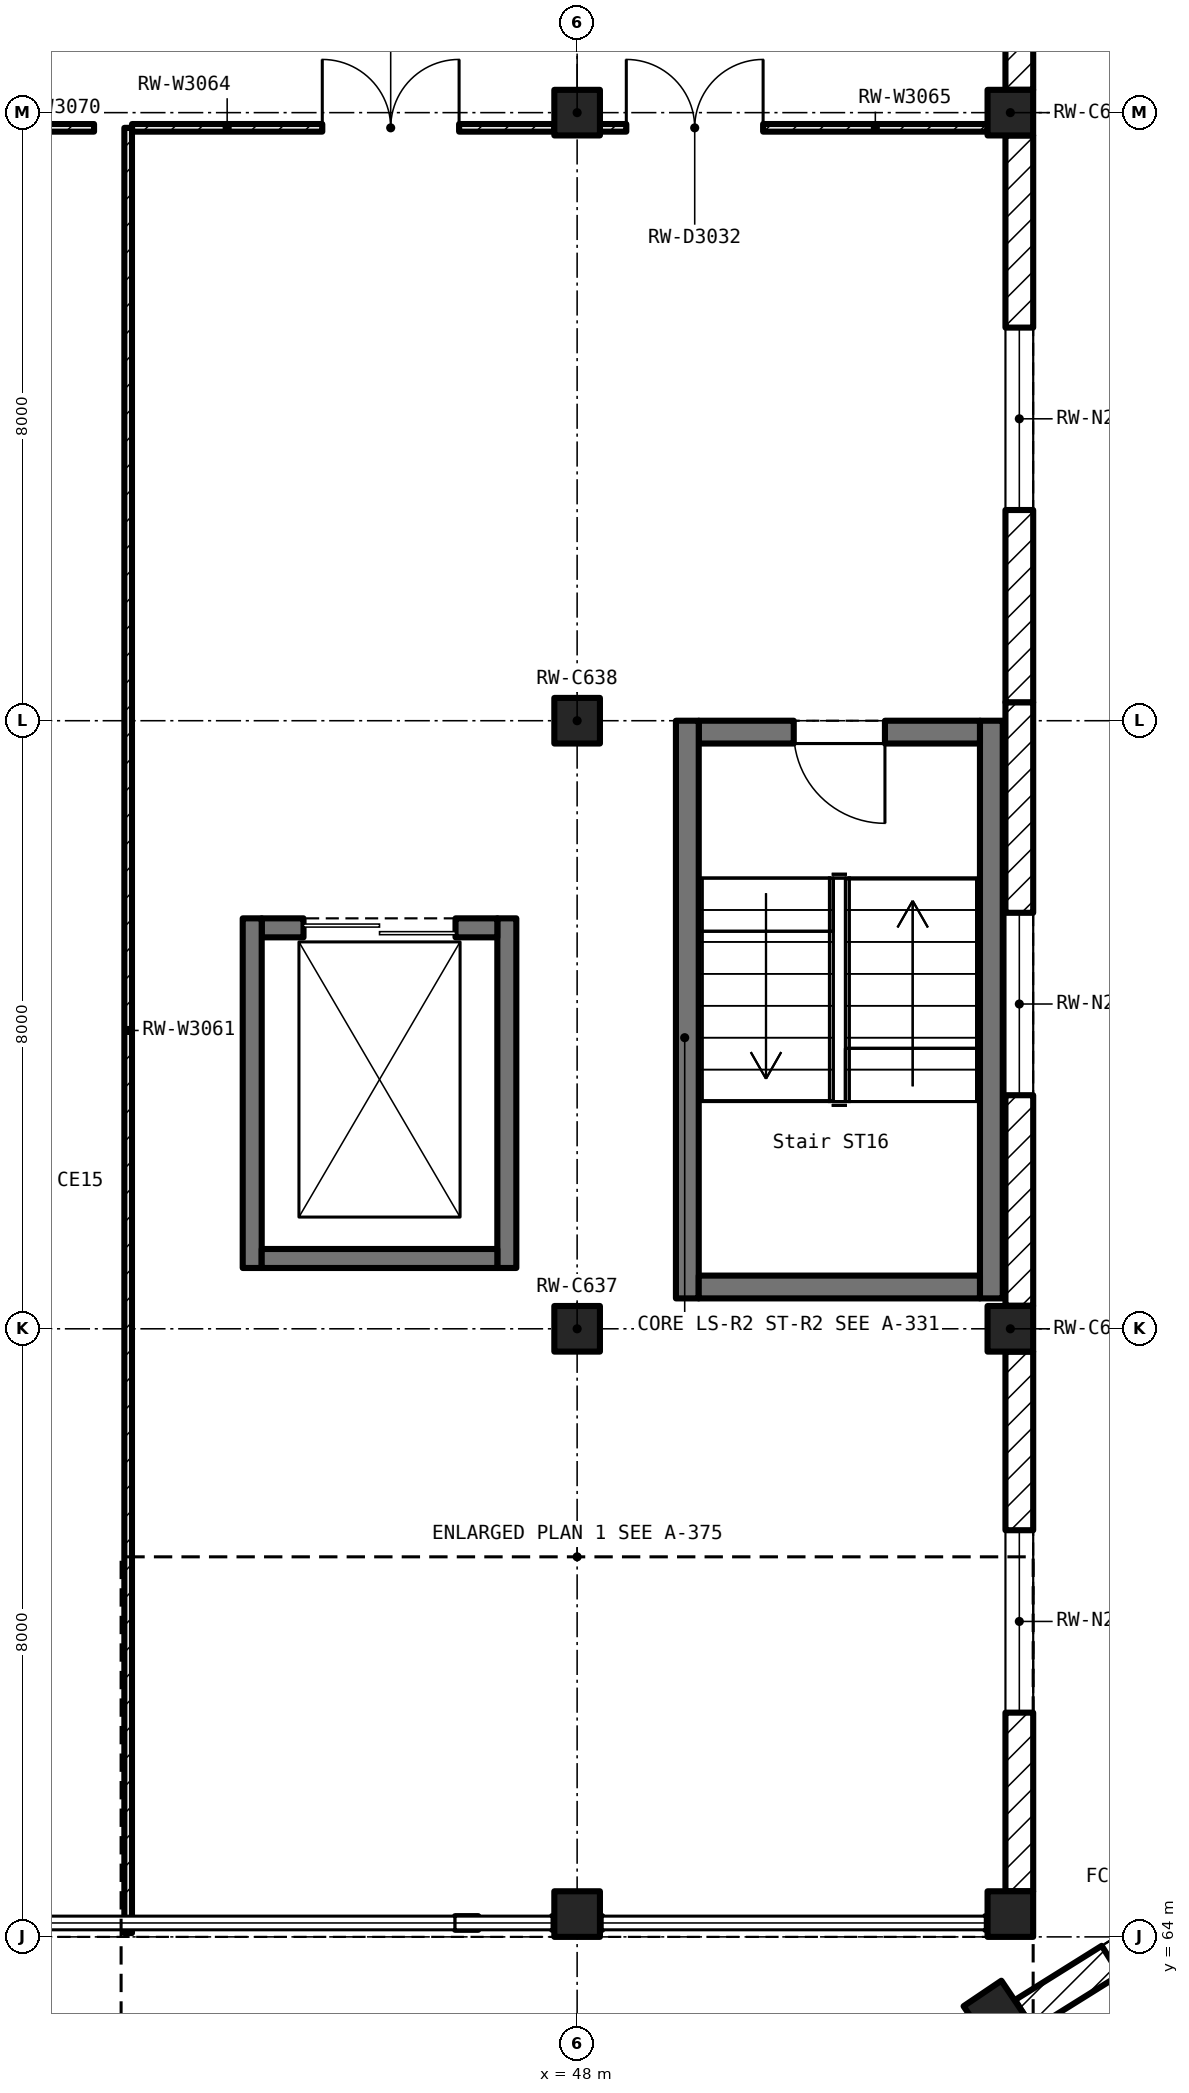
"""IFC4 building model, lengths in metres.
Left out: names, types, materials, properties, quantities, classifications, styles, units other than length and angle.
Written with IfcOpenShell. Run it as: python <this file> out.ifc"""

import sys

from ifc_helpers import new_model, si_unit, direction, frame, frame_2d, origin, origin_2d, place, context, subcontext, project, spatial, rectangle, extrude, element, fill, save


model = new_model("IFC4")
c1 = context("Model", 3, precision=1e-05, world=origin(), true_north=direction((0.0, 1.0)))
c2 = subcontext(c1, "Body", "Model", "MODEL_VIEW")
j1 = project(units=[si_unit("LENGTHUNIT", "METRE"), si_unit("PLANEANGLEUNIT", "RADIAN")], contexts=[c1])
p1 = place(None, origin())
s1 = spatial("IfcSite", under=j1, at=p1, CompositionType="ELEMENT")
p2 = place(p1, origin())
s2 = spatial("IfcBuilding", under=s1, at=p2, CompositionType="ELEMENT")
p3 = place(p2, frame((0.0, 0.0, 11.5)))
s3 = spatial("IfcBuildingStorey", under=s2, at=p3, CompositionType="ELEMENT", Elevation=11.5)
for number, where, z_axis, x_axis in (
    (1, (53.501, 63.007, 0.0), (0.0, 0.0, 1.0), (0.829, 0.559, 0.0)),
    (2, (48.0, 64.3, 0.0), (0.0, 0.0, 1.0), (1.0, 0.0, 0.0)),
    (3, (48.0, 72.0, 0.0), (0.0, 0.0, 1.0), (1.0, 0.0, 0.0)),
    (4, (48.0, 80.0, 0.0), (0.0, 0.0, 1.0), (1.0, 0.0, 0.0)),
    (5, (48.0, 88.0, 0.0), (0.0, 0.0, 1.0), (1.0, 0.0, 0.0)),
    (6, (53.7, 64.3, 0.0), (0.0, 0.0, 1.0), (1.0, 0.0, 0.0)),
    (7, (53.7, 72.0, 0.0), (0.0, 0.0, 1.0), (1.0, 0.0, 0.0)),
    (8, (53.7, 88.0, 0.0), (0.0, 0.0, 1.0), (1.0, 0.0, 0.0)),
):
    element("IfcColumn", number, at=place(p3, frame(where, z_axis=z_axis, x_axis=x_axis)), inside=s3, PredefinedType="COLUMN", context=c2, shape_type="SweptSolid", body=[
        extrude(rectangle(XDim=0.6, YDim=0.6, at=origin_2d()), origin(), (0.0, 0.0, 1.0), 5.5),
    ])
p4 = place(p3, frame((53.881, 62.979, 0.0), z_axis=(0.0, 0.0, 1.0), x_axis=(0.848094792162, 0.529844527676, 0.0)))
e9 = element("IfcWall", 9, at=p4, inside=s3, PredefinedType="SOLIDWALL", context=c2, shape_type="SweptSolid", body=[
    extrude(rectangle(XDim=4.69, YDim=0.45, at=frame_2d((2.345, 0.0))), origin(), (0.0, 0.0, 1.0), 4.48),
])
p5 = place(p4, frame((1.345, 0.0, 1.0)))
e10 = element("IfcOpeningElement", 10, at=p5, cuts=e9, PredefinedType="OPENING", context=c2, shape_type="SweptSolid", body=[
    extrude(rectangle(XDim=2.0, YDim=2.8, at=frame_2d((1.0, 1.4))), frame((0.0, 0.237, 0.0), z_axis=(0.0, -1.0, 0.0), x_axis=(1.0, 0.0, 0.0)), (0.0, 0.0, 1.0), 0.474),
])
p6 = place(p3, frame((53.818, 64.6, 0.0), z_axis=(0.0, 0.0, 1.0), x_axis=(0.0, 1.0, 0.0)))
e11 = element("IfcWall", 11, at=p6, inside=s3, PredefinedType="SOLIDWALL", context=c2, shape_type="SweptSolid", body=[
    extrude(rectangle(XDim=7.1, YDim=0.365, at=frame_2d((3.55, 0.0))), origin(), (0.0, 0.0, 1.0), 4.55),
])
p7 = place(p6, frame((2.35, 0.0, 1.0)))
e12 = element("IfcOpeningElement", 12, at=p7, cuts=e11, PredefinedType="OPENING", context=c2, shape_type="SweptSolid", body=[
    extrude(rectangle(XDim=2.4, YDim=2.0, at=frame_2d((1.2, 1.0))), frame((0.0, 0.195, 0.0), z_axis=(0.0, -1.0, 0.0), x_axis=(1.0, 0.0, 0.0)), (0.0, 0.0, 1.0), 0.389),
])
p8 = place(p3, frame((53.818, 72.304, 0.0), z_axis=(0.0, 0.0, 1.0), x_axis=(0.0, 1.0, 0.0)))
e13 = element("IfcWall", 13, at=p8, inside=s3, PredefinedType="SOLIDWALL", context=c2, shape_type="SweptSolid", body=[
    extrude(rectangle(XDim=7.939, YDim=0.365, at=frame_2d((3.969, 0.0))), origin(), (0.0, 0.0, 1.0), 4.55),
])
p9 = place(p8, frame((2.769, 0.0, 1.0)))
e14 = element("IfcOpeningElement", 14, at=p9, cuts=e13, PredefinedType="OPENING", context=c2, shape_type="SweptSolid", body=[
    extrude(rectangle(XDim=2.4, YDim=2.0, at=frame_2d((1.2, 1.0))), frame((0.0, 0.195, 0.0), z_axis=(0.0, -1.0, 0.0), x_axis=(1.0, 0.0, 0.0)), (0.0, 0.0, 1.0), 0.389),
])
p10 = place(p3, frame((53.818, 80.243, 0.0), z_axis=(0.0, 0.0, 1.0), x_axis=(0.0, 1.0, 0.0)))
e15 = element("IfcWall", 15, at=p10, inside=s3, PredefinedType="SOLIDWALL", context=c2, shape_type="SweptSolid", body=[
    extrude(rectangle(XDim=7.457, YDim=0.365, at=frame_2d((3.729, 0.0))), origin(), (0.0, 0.0, 1.0), 4.55),
])
p11 = place(p10, frame((2.529, 0.0, 1.0)))
e16 = element("IfcOpeningElement", 16, at=p11, cuts=e15, PredefinedType="OPENING", context=c2, shape_type="SweptSolid", body=[
    extrude(rectangle(XDim=2.4, YDim=2.0, at=frame_2d((1.2, 1.0))), frame((0.0, 0.195, 0.0), z_axis=(0.0, -1.0, 0.0), x_axis=(1.0, 0.0, 0.0)), (0.0, 0.0, 1.0), 0.389),
])
p12 = place(p3, frame((53.818, 88.3, 0.0), z_axis=(0.0, 0.0, 1.0), x_axis=(0.0, 1.0, 0.0)))
e17 = element("IfcWall", 17, at=p12, inside=s3, PredefinedType="SOLIDWALL", context=c2, shape_type="SweptSolid", body=[
    extrude(rectangle(XDim=7.4, YDim=0.365, at=frame_2d((3.7, 0.0))), origin(), (0.0, 0.0, 1.0), 4.55),
])
p13 = place(p12, frame((2.5, 0.0, 1.0)))
e18 = element("IfcOpeningElement", 18, at=p13, cuts=e17, PredefinedType="OPENING", context=c2, shape_type="SweptSolid", body=[
    extrude(rectangle(XDim=2.4, YDim=2.0, at=frame_2d((1.2, 1.0))), frame((0.0, 0.195, 0.0), z_axis=(0.0, -1.0, 0.0), x_axis=(1.0, 0.0, 0.0)), (0.0, 0.0, 1.0), 0.389),
])
p14 = place(p3, frame((53.45, 72.4, 0.0), z_axis=(0.0, 0.0, 1.0), x_axis=(0.0, 1.0, 0.0)))
e19 = element("IfcWall", 19, at=p14, inside=s3, PredefinedType="SOLIDWALL", context=c2, shape_type="SweptSolid", body=[
    extrude(rectangle(XDim=7.6, YDim=0.3, at=frame_2d((3.8, 0.0))), origin(), (0.0, 0.0, 1.0), 5.5),
])
p15 = place(p3, frame((53.3, 79.85, 0.0), z_axis=(0.0, 0.0, 1.0), x_axis=(-1.0, 0.0, 0.0)))
e20 = element("IfcWall", 20, at=p15, inside=s3, PredefinedType="SOLIDWALL", context=c2, shape_type="SweptSolid", body=[
    extrude(rectangle(XDim=3.7, YDim=0.3, at=frame_2d((1.85, 0.0))), origin(), (0.0, 0.0, 1.0), 5.5),
])
p16 = place(p15, frame((1.25, 0.0, 0.0)))
e21 = element("IfcOpeningElement", 21, at=p16, cuts=e20, PredefinedType="OPENING", context=c2, shape_type="SweptSolid", body=[
    extrude(rectangle(XDim=1.2, YDim=2.1, at=frame_2d((0.6, 1.05))), frame((0.0, 0.162, 0.0), z_axis=(0.0, -1.0, 0.0), x_axis=(1.0, 0.0, 0.0)), (0.0, 0.0, 1.0), 0.324),
])
p17 = place(p3, frame((49.45, 80.0, 0.0), z_axis=(0.0, 0.0, 1.0), x_axis=(0.0, -1.0, 0.0)))
e22 = element("IfcWall", 22, at=p17, inside=s3, PredefinedType="SOLIDWALL", context=c2, shape_type="SweptSolid", body=[
    extrude(rectangle(XDim=7.6, YDim=0.3, at=frame_2d((3.8, 0.0))), origin(), (0.0, 0.0, 1.0), 5.5),
])
p18 = place(p3, frame((49.6, 72.55, 0.0), z_axis=(0.0, 0.0, 1.0), x_axis=(1.0, 0.0, 0.0)))
e23 = element("IfcWall", 23, at=p18, inside=s3, PredefinedType="SOLIDWALL", context=c2, shape_type="SweptSolid", body=[
    extrude(rectangle(XDim=3.7, YDim=0.3, at=frame_2d((1.85, 0.0))), origin(), (0.0, 0.0, 1.0), 5.5),
])
p19 = place(p3, frame((59.019, 65.542, 0.0), z_axis=(0.0, 0.0, 1.0), x_axis=(-0.819160804606, -0.573563925118, 0.0)))
e24 = element("IfcWall", 24, at=p19, inside=s3, PredefinedType="SOLIDWALL", context=c2, shape_type="SweptSolid", body=[
    extrude(rectangle(XDim=5.0, YDim=0.3, at=frame_2d((2.5, 0.0))), origin(), (0.0, 0.0, 1.0), 5.5),
])
p20 = place(p3, frame((47.075, 72.8, 0.0), z_axis=(0.0, 0.0, 1.0), x_axis=(0.0, 1.0, 0.0)))
e25 = element("IfcWall", 25, at=p20, inside=s3, PredefinedType="SOLIDWALL", context=c2, shape_type="SweptSolid", body=[
    extrude(rectangle(XDim=4.6, YDim=0.25, at=frame_2d((2.3, 0.0))), origin(), (0.0, 0.0, 1.0), 5.5),
])
p21 = place(p3, frame((46.95, 77.275, 0.0), z_axis=(0.0, 0.0, 1.0), x_axis=(-1.0, 0.0, 0.0)))
e26 = element("IfcWall", 26, at=p21, inside=s3, PredefinedType="SOLIDWALL", context=c2, shape_type="SweptSolid", body=[
    extrude(rectangle(XDim=3.1, YDim=0.25, at=frame_2d((1.55, 0.0))), origin(), (0.0, 0.0, 1.0), 5.5),
])
p22 = place(p21, frame((0.55, 0.0, 0.0)))
e27 = element("IfcOpeningElement", 27, at=p22, cuts=e26, PredefinedType="OPENING", context=c2, shape_type="SweptSolid", body=[
    extrude(rectangle(XDim=2.0, YDim=2.2, at=frame_2d((1.0, 1.1))), frame((0.0, 0.137, 0.0), z_axis=(0.0, -1.0, 0.0), x_axis=(1.0, 0.0, 0.0)), (0.0, 0.0, 1.0), 0.274),
])
p23 = place(p3, frame((43.725, 77.4, 0.0), z_axis=(0.0, 0.0, 1.0), x_axis=(0.0, -1.0, 0.0)))
e28 = element("IfcWall", 28, at=p23, inside=s3, PredefinedType="SOLIDWALL", context=c2, shape_type="SweptSolid", body=[
    extrude(rectangle(XDim=4.6, YDim=0.25, at=frame_2d((2.3, 0.0))), origin(), (0.0, 0.0, 1.0), 5.5),
])
p24 = place(p3, frame((43.85, 72.925, 0.0), z_axis=(0.0, 0.0, 1.0), x_axis=(1.0, 0.0, 0.0)))
e29 = element("IfcWall", 29, at=p24, inside=s3, PredefinedType="SOLIDWALL", context=c2, shape_type="SweptSolid", body=[
    extrude(rectangle(XDim=3.1, YDim=0.25, at=frame_2d((1.55, 0.0))), origin(), (0.0, 0.0, 1.0), 5.5),
])
p25 = place(p3, frame((42.093, 87.8, 0.0), z_axis=(0.0, 0.0, 1.0), x_axis=(0.0, -1.0, 0.0)))
e30 = element("IfcWall", 30, at=p25, inside=s3, PredefinedType="PARTITIONING", context=c2, shape_type="SweptSolid", body=[
    extrude(rectangle(XDim=23.75, YDim=0.1, at=frame_2d((11.875, 0.0))), origin(), (0.0, 0.0, 1.0), 4.45),
])
p26 = place(p3, frame((42.144, 87.8, 0.0), z_axis=(0.0, 0.0, 1.0), x_axis=(1.0, 0.0, 0.0)))
e31 = element("IfcWall", 31, at=p26, inside=s3, PredefinedType="PARTITIONING", context=c2, shape_type="SweptSolid", body=[
    extrude(rectangle(XDim=5.556, YDim=0.1, at=frame_2d((2.778, 0.0))), origin(), (0.0, 0.0, 1.0), 4.45),
])
p27 = place(p26, frame((2.503, 0.0, 0.0)))
e32 = element("IfcOpeningElement", 32, at=p27, cuts=e31, PredefinedType="OPENING", context=c2, shape_type="SweptSolid", body=[
    extrude(rectangle(XDim=1.8, YDim=2.1, at=frame_2d((0.9, 1.05))), frame((0.0, 0.062, 0.0), z_axis=(0.0, -1.0, 0.0), x_axis=(1.0, 0.0, 0.0)), (0.0, 0.0, 1.0), 0.124),
])
p28 = place(p3, frame((48.3, 87.8, 0.0), z_axis=(0.0, 0.0, 1.0), x_axis=(1.0, 0.0, 0.0)))
e33 = element("IfcWall", 33, at=p28, inside=s3, PredefinedType="PARTITIONING", context=c2, shape_type="SweptSolid", body=[
    extrude(rectangle(XDim=5.1, YDim=0.1, at=frame_2d((2.55, 0.0))), origin(), (0.0, 0.0, 1.0), 4.45),
])
p29 = place(p28, frame((0.347, 0.0, 0.0)))
e34 = element("IfcOpeningElement", 34, at=p29, cuts=e33, PredefinedType="OPENING", context=c2, shape_type="SweptSolid", body=[
    extrude(rectangle(XDim=1.8, YDim=2.1, at=frame_2d((0.9, 1.05))), frame((0.0, 0.062, 0.0), z_axis=(0.0, -1.0, 0.0), x_axis=(1.0, 0.0, 0.0)), (0.0, 0.0, 1.0), 0.124),
])
p30 = place(p3, frame((40.3, 87.8, 0.0), z_axis=(0.0, 0.0, 1.0), x_axis=(1.0, 0.0, 0.0)))
e35 = element("IfcWall", 35, at=p30, inside=s3, PredefinedType="PARTITIONING", context=c2, shape_type="SweptSolid", body=[
    extrude(rectangle(XDim=1.344, YDim=0.1, at=frame_2d((0.672, 0.0))), origin(), (0.0, 0.0, 1.0), 4.45),
])
p31 = place(p3, frame((46.394, 64.183, 0.0), z_axis=(0.0, 0.0, 1.0), x_axis=(1.0, 0.0, 0.0)))
e36 = element("IfcWall", 36, at=p31, inside=s3, PredefinedType="SOLIDWALL", context=c2, shape_type="SweptSolid", body=[
    extrude(rectangle(XDim=0.305, YDim=0.18, at=frame_2d((0.152, 0.0))), origin(), (0.0, 0.0, 1.0), 3.7),
])
p32 = place(p3, frame((47.67, 64.183, 0.0), z_axis=(0.0, 0.0, 1.0), x_axis=(1.0, 0.0, 0.0)))
e37 = element("IfcWall", 37, at=p32, inside=s3, PredefinedType="SOLIDWALL", context=c2, shape_type="SweptSolid", body=[
    extrude(rectangle(XDim=0.305, YDim=0.18, at=frame_2d((0.153, 0.0))), origin(), (0.0, 0.0, 1.0), 3.7),
])
p33 = place(p3, frame((53.37, 64.183, 0.0), z_axis=(0.0, 0.0, 1.0), x_axis=(1.0, 0.0, 0.0)))
e38 = element("IfcWall", 38, at=p33, inside=s3, PredefinedType="SOLIDWALL", context=c2, shape_type="SweptSolid", body=[
    extrude(rectangle(XDim=0.305, YDim=0.18, at=frame_2d((0.152, 0.0))), origin(), (0.0, 0.0, 1.0), 3.7),
])
p34 = place(p3, frame((48.33, 64.183, 0.0), z_axis=(0.0, 0.0, 1.0), x_axis=(-1.0, 0.0, 0.0)))
e39 = element("IfcWall", 39, at=p34, inside=s3, PredefinedType="SOLIDWALL", context=c2, shape_type="SweptSolid", body=[
    extrude(rectangle(XDim=0.305, YDim=0.18, at=frame_2d((0.153, 0.0))), origin(), (0.0, 0.0, 1.0), 3.7),
])
p35 = place(p7, origin())
e40 = element("IfcWindow", 40, at=p35, inside=s3, PartitioningType="DOUBLE_PANEL_VERTICAL", PredefinedType="WINDOW", context=c2, shape_type="SweptSolid", body=[
    extrude(rectangle(XDim=2.4, YDim=2.0, at=frame_2d((1.2, 1.0))), frame((0.0, 0.03, 0.0), z_axis=(0.0, -1.0, 0.0), x_axis=(1.0, 0.0, 0.0)), (0.0, 0.0, 1.0), 0.06),
])
fill(e12, e40)
p36 = place(p9, origin())
e41 = element("IfcWindow", 41, at=p36, inside=s3, PartitioningType="DOUBLE_PANEL_VERTICAL", PredefinedType="WINDOW", context=c2, shape_type="SweptSolid", body=[
    extrude(rectangle(XDim=2.4, YDim=2.0, at=frame_2d((1.2, 1.0))), frame((0.0, 0.03, 0.0), z_axis=(0.0, -1.0, 0.0), x_axis=(1.0, 0.0, 0.0)), (0.0, 0.0, 1.0), 0.06),
])
fill(e14, e41)
p37 = place(p11, origin())
e42 = element("IfcWindow", 42, at=p37, inside=s3, PartitioningType="DOUBLE_PANEL_VERTICAL", PredefinedType="WINDOW", context=c2, shape_type="SweptSolid", body=[
    extrude(rectangle(XDim=2.4, YDim=2.0, at=frame_2d((1.2, 1.0))), frame((0.0, 0.03, 0.0), z_axis=(0.0, -1.0, 0.0), x_axis=(1.0, 0.0, 0.0)), (0.0, 0.0, 1.0), 0.06),
])
fill(e16, e42)
p38 = place(p16, origin())
e43 = element("IfcDoor", 43, at=p38, inside=s3, OperationType="SINGLE_SWING_LEFT", PredefinedType="DOOR", context=c2, shape_type="SweptSolid", body=[
    extrude(rectangle(XDim=1.2, YDim=2.1, at=frame_2d((0.6, 1.05))), frame((0.0, 0.025, 0.0), z_axis=(0.0, -1.0, 0.0), x_axis=(1.0, 0.0, 0.0)), (0.0, 0.0, 1.0), 0.05),
])
fill(e21, e43)
p39 = place(p22, origin())
e44 = element("IfcDoor", 44, at=p39, inside=s3, OperationType="DOUBLE_DOOR_SLIDING", PredefinedType="DOOR", context=c2, shape_type="SweptSolid", body=[
    extrude(rectangle(XDim=2.0, YDim=2.2, at=frame_2d((1.0, 1.1))), frame((0.0, 0.025, 0.0), z_axis=(0.0, -1.0, 0.0), x_axis=(1.0, 0.0, 0.0)), (0.0, 0.0, 1.0), 0.05),
])
fill(e27, e44)
p40 = place(p29, origin())
e45 = element("IfcDoor", 45, at=p40, inside=s3, OperationType="DOUBLE_DOOR_SINGLE_SWING", PredefinedType="DOOR", context=c2, shape_type="SweptSolid", body=[
    extrude(rectangle(XDim=1.8, YDim=2.1, at=frame_2d((0.9, 1.05))), frame((0.0, 0.025, 0.0), z_axis=(0.0, -1.0, 0.0), x_axis=(1.0, 0.0, 0.0)), (0.0, 0.0, 1.0), 0.05),
])
fill(e34, e45)
p41 = place(p27, origin())
e46 = element("IfcDoor", 46, at=p41, inside=s3, OperationType="DOUBLE_DOOR_SINGLE_SWING", PredefinedType="DOOR", context=c2, shape_type="SweptSolid", body=[
    extrude(rectangle(XDim=1.8, YDim=2.1, at=frame_2d((0.9, 1.05))), frame((0.0, 0.025, 0.0), z_axis=(0.0, -1.0, 0.0), x_axis=(1.0, 0.0, 0.0)), (0.0, 0.0, 1.0), 0.05),
])
fill(e32, e46)
save(model, sys.argv[1])
